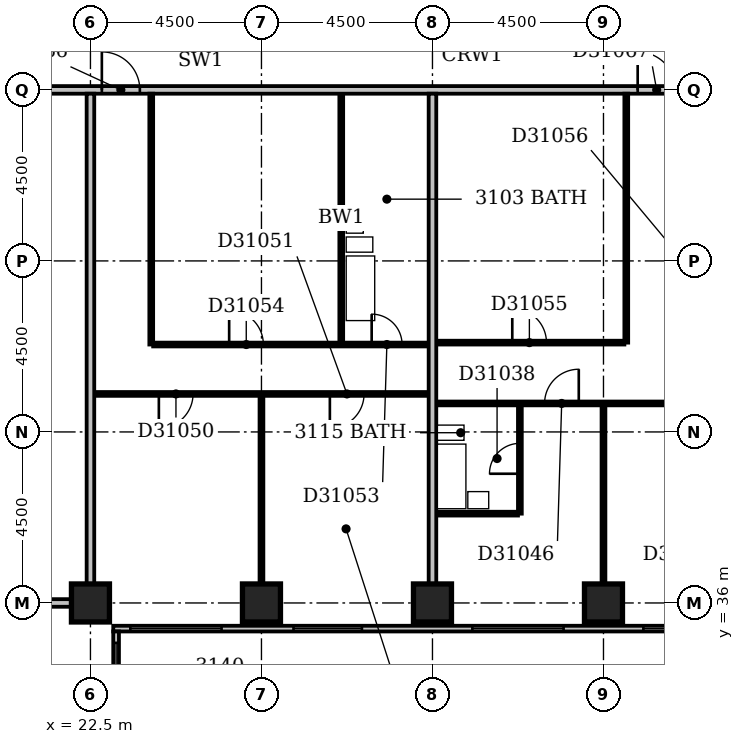
"""IFC4 building model, lengths in metres.
Left out: names, types, materials, properties, quantities, classifications, styles, units other than length and angle.
Written with IfcOpenShell. Run it as: python <this file> out.ifc"""

import sys

from ifc_helpers import new_model, si_unit, direction, frame, frame_2d, origin, origin_2d, place, context, subcontext, project, spatial, rectangle, extrude, element, fill, save


model = new_model("IFC4")
c1 = context("Model", 3, precision=1e-05, world=origin(), true_north=direction((0.0, 1.0)))
c2 = subcontext(c1, "Body", "Model", "MODEL_VIEW")
j1 = project(units=[si_unit("LENGTHUNIT", "METRE"), si_unit("PLANEANGLEUNIT", "RADIAN")], contexts=[c1])
p1 = place(None, origin())
s1 = spatial("IfcSite", under=j1, at=p1, CompositionType="ELEMENT")
p2 = place(p1, origin())
s2 = spatial("IfcBuilding", under=s1, at=p2, CompositionType="ELEMENT")
p3 = place(p2, frame((0.0, 0.0, 126.8)))
s3 = spatial("IfcBuildingStorey", under=s2, at=p3, CompositionType="ELEMENT", Elevation=126.8)
for number, where, z_axis, x_axis in (
    (1, (22.5, 36.0, -0.3), (0.0, 0.0, 1.0), (1.0, 0.0, 0.0)),
    (2, (27.0, 36.0, -0.3), (0.0, 0.0, 1.0), (1.0, 0.0, 0.0)),
    (3, (31.5, 36.0, -0.3), (0.0, 0.0, 1.0), (1.0, 0.0, 0.0)),
    (4, (36.0, 36.0, -0.3), (0.0, 0.0, 1.0), (1.0, 0.0, 0.0)),
):
    element("IfcColumn", number, at=place(p3, frame(where, z_axis=z_axis, x_axis=x_axis)), inside=s3, PredefinedType="COLUMN", context=c2, shape_type="SweptSolid", body=[
        extrude(rectangle(XDim=1.0, YDim=1.0, at=origin_2d()), origin(), (0.0, 0.0, 1.0), 3.6),
    ])
p4 = place(p3, frame((23.175, 17.4, 0.0), z_axis=(0.0, 0.0, 1.0), x_axis=(0.0, 1.0, 0.0)))
e5 = element("IfcWall", 5, at=p4, inside=s3, PredefinedType="STANDARD", context=c2, shape_type="SweptSolid", body=[
    extrude(rectangle(XDim=17.85, YDim=0.15, at=frame_2d((8.925, 0.0))), origin(), (0.0, 0.0, 1.0), 2.7),
])
p5 = place(p4, frame((1.65, 0.0, 0.6)))
e6 = element("IfcOpeningElement", 6, at=p5, cuts=e5, PredefinedType="OPENING", context=c2, shape_type="SweptSolid", body=[
    extrude(rectangle(XDim=2.4, YDim=1.8, at=frame_2d((1.2, 0.9))), frame((0.0, 0.087, 0.0), z_axis=(0.0, -1.0, 0.0), x_axis=(1.0, 0.0, 0.0)), (0.0, 0.0, 1.0), 0.174),
])
p6 = place(p4, frame((6.15, 0.0, 0.6)))
e7 = element("IfcOpeningElement", 7, at=p6, cuts=e5, PredefinedType="OPENING", context=c2, shape_type="SweptSolid", body=[
    extrude(rectangle(XDim=2.4, YDim=1.8, at=frame_2d((1.2, 0.9))), frame((0.0, 0.087, 0.0), z_axis=(0.0, -1.0, 0.0), x_axis=(1.0, 0.0, 0.0)), (0.0, 0.0, 1.0), 0.174),
])
p7 = place(p4, frame((11.498, 0.0, 0.6)))
e8 = element("IfcOpeningElement", 8, at=p7, cuts=e5, PredefinedType="OPENING", context=c2, shape_type="SweptSolid", body=[
    extrude(rectangle(XDim=1.8, YDim=1.8, at=frame_2d((0.9, 0.9))), frame((0.0, 0.087, 0.0), z_axis=(0.0, -1.0, 0.0), x_axis=(1.0, 0.0, 0.0)), (0.0, 0.0, 1.0), 0.174),
])
p8 = place(p4, frame((15.15, 0.0, 0.6)))
e9 = element("IfcOpeningElement", 9, at=p8, cuts=e5, PredefinedType="OPENING", context=c2, shape_type="SweptSolid", body=[
    extrude(rectangle(XDim=2.4, YDim=1.8, at=frame_2d((1.2, 0.9))), frame((0.0, 0.087, 0.0), z_axis=(0.0, -1.0, 0.0), x_axis=(1.0, 0.0, 0.0)), (0.0, 0.0, 1.0), 0.174),
])
p9 = place(p3, frame((23.1, 35.325, 0.0), z_axis=(0.0, 0.0, 1.0), x_axis=(1.0, 0.0, 0.0)))
e10 = element("IfcWall", 10, at=p9, inside=s3, PredefinedType="STANDARD", context=c2, shape_type="SweptSolid", body=[
    extrude(rectangle(XDim=45.15, YDim=0.15, at=frame_2d((22.575, 0.0))), origin(), (0.0, 0.0, 1.0), 2.7),
])
p10 = place(p9, frame((0.45, 0.0, 0.6)))
e11 = element("IfcOpeningElement", 11, at=p10, cuts=e10, PredefinedType="OPENING", context=c2, shape_type="SweptSolid", body=[
    extrude(rectangle(XDim=2.4, YDim=1.8, at=frame_2d((1.2, 0.9))), frame((0.0, 0.087, 0.0), z_axis=(0.0, -1.0, 0.0), x_axis=(1.0, 0.0, 0.0)), (0.0, 0.0, 1.0), 0.174),
])
p11 = place(p9, frame((4.743, 0.0, 0.6)))
e12 = element("IfcOpeningElement", 12, at=p11, cuts=e10, PredefinedType="OPENING", context=c2, shape_type="SweptSolid", body=[
    extrude(rectangle(XDim=1.8, YDim=1.8, at=frame_2d((0.9, 0.9))), frame((0.0, 0.087, 0.0), z_axis=(0.0, -1.0, 0.0), x_axis=(1.0, 0.0, 0.0)), (0.0, 0.0, 1.0), 0.174),
])
p12 = place(p9, frame((9.45, 0.0, 0.6)))
e13 = element("IfcOpeningElement", 13, at=p12, cuts=e10, PredefinedType="OPENING", context=c2, shape_type="SweptSolid", body=[
    extrude(rectangle(XDim=2.4, YDim=1.8, at=frame_2d((1.2, 0.9))), frame((0.0, 0.087, 0.0), z_axis=(0.0, -1.0, 0.0), x_axis=(1.0, 0.0, 0.0)), (0.0, 0.0, 1.0), 0.174),
])
p13 = place(p9, frame((13.95, 0.0, 0.6)))
e14 = element("IfcOpeningElement", 14, at=p13, cuts=e10, PredefinedType="OPENING", context=c2, shape_type="SweptSolid", body=[
    extrude(rectangle(XDim=2.4, YDim=1.8, at=frame_2d((1.2, 0.9))), frame((0.0, 0.087, 0.0), z_axis=(0.0, -1.0, 0.0), x_axis=(1.0, 0.0, 0.0)), (0.0, 0.0, 1.0), 0.174),
])
p14 = place(p9, frame((19.646, 0.0, 0.6)))
e15 = element("IfcOpeningElement", 15, at=p14, cuts=e10, PredefinedType="OPENING", context=c2, shape_type="SweptSolid", body=[
    extrude(rectangle(XDim=1.5, YDim=1.8, at=frame_2d((0.75, 0.9))), frame((0.0, 0.087, 0.0), z_axis=(0.0, -1.0, 0.0), x_axis=(1.0, 0.0, 0.0)), (0.0, 0.0, 1.0), 0.174),
])
p15 = place(p9, frame((22.95, 0.0, 0.6)))
e16 = element("IfcOpeningElement", 16, at=p15, cuts=e10, PredefinedType="OPENING", context=c2, shape_type="SweptSolid", body=[
    extrude(rectangle(XDim=2.4, YDim=1.8, at=frame_2d((1.2, 0.9))), frame((0.0, 0.087, 0.0), z_axis=(0.0, -1.0, 0.0), x_axis=(1.0, 0.0, 0.0)), (0.0, 0.0, 1.0), 0.174),
])
p16 = place(p9, frame((27.45, 0.0, 0.6)))
e17 = element("IfcOpeningElement", 17, at=p16, cuts=e10, PredefinedType="OPENING", context=c2, shape_type="SweptSolid", body=[
    extrude(rectangle(XDim=2.4, YDim=1.8, at=frame_2d((1.2, 0.9))), frame((0.0, 0.087, 0.0), z_axis=(0.0, -1.0, 0.0), x_axis=(1.0, 0.0, 0.0)), (0.0, 0.0, 1.0), 0.174),
])
p17 = place(p9, frame((31.95, 0.0, 0.6)))
e18 = element("IfcOpeningElement", 18, at=p17, cuts=e10, PredefinedType="OPENING", context=c2, shape_type="SweptSolid", body=[
    extrude(rectangle(XDim=2.4, YDim=1.8, at=frame_2d((1.2, 0.9))), frame((0.0, 0.087, 0.0), z_axis=(0.0, -1.0, 0.0), x_axis=(1.0, 0.0, 0.0)), (0.0, 0.0, 1.0), 0.174),
])
p18 = place(p9, frame((37.911, 0.0, 0.6)))
e19 = element("IfcOpeningElement", 19, at=p18, cuts=e10, PredefinedType="OPENING", context=c2, shape_type="SweptSolid", body=[
    extrude(rectangle(XDim=1.2, YDim=1.8, at=frame_2d((0.6, 0.9))), frame((0.0, 0.087, 0.0), z_axis=(0.0, -1.0, 0.0), x_axis=(1.0, 0.0, 0.0)), (0.0, 0.0, 1.0), 0.174),
])
p19 = place(p9, frame((40.95, 0.0, 0.6)))
e20 = element("IfcOpeningElement", 20, at=p19, cuts=e10, PredefinedType="OPENING", context=c2, shape_type="SweptSolid", body=[
    extrude(rectangle(XDim=2.4, YDim=1.8, at=frame_2d((1.2, 0.9))), frame((0.0, 0.087, 0.0), z_axis=(0.0, -1.0, 0.0), x_axis=(1.0, 0.0, 0.0)), (0.0, 0.0, 1.0), 0.174),
])
for number, where, z_axis, x_axis in (
    (21, (9.1, 36.0, 0.0), (0.0, 0.0, 1.0), (1.0, 0.0, 0.0)),
    (22, (22.5, 36.5, 0.0), (0.0, 0.0, 1.0), (0.0, 1.0, 0.0)),
):
    element("IfcWall", number, at=place(p3, frame(where, z_axis=z_axis, x_axis=x_axis)), inside=s3, PredefinedType="PARTITIONING", context=c2, shape_type="SweptSolid", body=[
        extrude(rectangle(XDim=12.9, YDim=0.2, at=frame_2d((6.45, 0.0))), origin(), (0.0, 0.0, 1.0), 3.3),
    ])
p20 = place(p3, frame((27.0, 36.5, 0.0), z_axis=(0.0, 0.0, 1.0), x_axis=(0.0, 1.0, 0.0)))
e23 = element("IfcWall", 23, at=p20, inside=s3, PredefinedType="PARTITIONING", context=c2, shape_type="SweptSolid", body=[
    extrude(rectangle(XDim=4.95, YDim=0.1, at=frame_2d((2.475, 0.0))), origin(), (0.0, 0.0, 1.0), 2.6),
])
p21 = place(p3, frame((31.5, 36.5, 0.0), z_axis=(0.0, 0.0, 1.0), x_axis=(0.0, 1.0, 0.0)))
e24 = element("IfcWall", 24, at=p21, inside=s3, PredefinedType="PARTITIONING", context=c2, shape_type="SweptSolid", body=[
    extrude(rectangle(XDim=12.9, YDim=0.2, at=frame_2d((6.45, 0.0))), origin(), (0.0, 0.0, 1.0), 3.3),
])
p22 = place(p3, frame((36.0, 36.5, 0.0), z_axis=(0.0, 0.0, 1.0), x_axis=(0.0, 1.0, 0.0)))
e25 = element("IfcWall", 25, at=p22, inside=s3, PredefinedType="PARTITIONING", context=c2, shape_type="SweptSolid", body=[
    extrude(rectangle(XDim=4.7, YDim=0.1, at=frame_2d((2.35, 0.0))), origin(), (0.0, 0.0, 1.0), 2.4),
])
p23 = place(p3, frame((31.6, 38.35, 0.0), z_axis=(0.0, 0.0, 1.0), x_axis=(1.0, 0.0, 0.0)))
e26 = element("IfcWall", 26, at=p23, inside=s3, PredefinedType="PLUMBINGWALL", context=c2, shape_type="SweptSolid", body=[
    extrude(rectangle(XDim=2.15, YDim=0.1, at=frame_2d((1.075, 0.0))), origin(), (0.0, 0.0, 1.0), 3.3),
])
p24 = place(p3, frame((33.8, 38.35, 0.0), z_axis=(0.0, 0.0, 1.0), x_axis=(0.0, 1.0, 0.0)))
e27 = element("IfcWall", 27, at=p24, inside=s3, PredefinedType="PLUMBINGWALL", context=c2, shape_type="SweptSolid", body=[
    extrude(rectangle(XDim=2.85, YDim=0.1, at=frame_2d((1.425, 0.0))), origin(), (0.0, 0.0, 1.0), 3.3),
])
p25 = place(p24, frame((1.05, 0.0, 0.0)))
e28 = element("IfcOpeningElement", 28, at=p25, cuts=e27, PredefinedType="OPENING", context=c2, shape_type="SweptSolid", body=[
    extrude(rectangle(XDim=0.8, YDim=2.1, at=frame_2d((0.4, 1.05))), frame((0.0, 0.062, 0.0), z_axis=(0.0, -1.0, 0.0), x_axis=(1.0, 0.0, 0.0)), (0.0, 0.0, 1.0), 0.124),
])
p26 = place(p3, frame((31.6, 41.25, 0.0), z_axis=(0.0, 0.0, 1.0), x_axis=(1.0, 0.0, 0.0)))
e29 = element("IfcWall", 29, at=p26, inside=s3, PredefinedType="PARTITIONING", context=c2, shape_type="SweptSolid", body=[
    extrude(rectangle(XDim=17.8, YDim=0.1, at=frame_2d((8.9, 0.0))), origin(), (0.0, 0.0, 1.0), 3.3),
])
p27 = place(p26, frame((2.85, 0.0, 0.0)))
e30 = element("IfcOpeningElement", 30, at=p27, cuts=e29, PredefinedType="OPENING", context=c2, shape_type="SweptSolid", body=[
    extrude(rectangle(XDim=0.9, YDim=2.1, at=frame_2d((0.45, 1.05))), frame((0.0, 0.062, 0.0), z_axis=(0.0, -1.0, 0.0), x_axis=(1.0, 0.0, 0.0)), (0.0, 0.0, 1.0), 0.124),
])
p28 = place(p26, frame((8.4, 0.0, 0.0)))
e31 = element("IfcOpeningElement", 31, at=p28, cuts=e29, PredefinedType="OPENING", context=c2, shape_type="SweptSolid", body=[
    extrude(rectangle(XDim=0.9, YDim=2.1, at=frame_2d((0.45, 1.05))), frame((0.0, 0.062, 0.0), z_axis=(0.0, -1.0, 0.0), x_axis=(1.0, 0.0, 0.0)), (0.0, 0.0, 1.0), 0.124),
])
p29 = place(p26, frame((14.05, 0.0, 0.0)))
e32 = element("IfcOpeningElement", 32, at=p29, cuts=e29, PredefinedType="OPENING", context=c2, shape_type="SweptSolid", body=[
    extrude(rectangle(XDim=0.9, YDim=2.1, at=frame_2d((0.45, 1.05))), frame((0.0, 0.062, 0.0), z_axis=(0.0, -1.0, 0.0), x_axis=(1.0, 0.0, 0.0)), (0.0, 0.0, 1.0), 0.124),
])
p30 = place(p3, frame((22.6, 41.5, 0.0), z_axis=(0.0, 0.0, 1.0), x_axis=(1.0, 0.0, 0.0)))
e33 = element("IfcWall", 33, at=p30, inside=s3, PredefinedType="PARTITIONING", context=c2, shape_type="SweptSolid", body=[
    extrude(rectangle(XDim=8.8, YDim=0.1, at=frame_2d((4.4, 0.0))), origin(), (0.0, 0.0, 1.0), 3.3),
])
p31 = place(p30, frame((1.7, 0.0, 0.0)))
e34 = element("IfcOpeningElement", 34, at=p31, cuts=e33, PredefinedType="OPENING", context=c2, shape_type="SweptSolid", body=[
    extrude(rectangle(XDim=0.9, YDim=2.1, at=frame_2d((0.45, 1.05))), frame((0.0, 0.062, 0.0), z_axis=(0.0, -1.0, 0.0), x_axis=(1.0, 0.0, 0.0)), (0.0, 0.0, 1.0), 0.124),
])
p32 = place(p30, frame((6.2, 0.0, 0.0)))
e35 = element("IfcOpeningElement", 35, at=p32, cuts=e33, PredefinedType="OPENING", context=c2, shape_type="SweptSolid", body=[
    extrude(rectangle(XDim=0.9, YDim=2.1, at=frame_2d((0.45, 1.05))), frame((0.0, 0.062, 0.0), z_axis=(0.0, -1.0, 0.0), x_axis=(1.0, 0.0, 0.0)), (0.0, 0.0, 1.0), 0.124),
])
p33 = place(p3, frame((24.1, 42.8, 0.0), z_axis=(0.0, 0.0, 1.0), x_axis=(0.0, 1.0, 0.0)))
e36 = element("IfcWall", 36, at=p33, inside=s3, PredefinedType="PARTITIONING", context=c2, shape_type="SweptSolid", body=[
    extrude(rectangle(XDim=6.6, YDim=0.1, at=frame_2d((3.3, 0.0))), origin(), (0.0, 0.0, 1.0), 3.3),
])
p34 = place(p3, frame((24.15, 42.8, 0.0), z_axis=(0.0, 0.0, 1.0), x_axis=(1.0, 0.0, 0.0)))
e37 = element("IfcWall", 37, at=p34, inside=s3, PredefinedType="PARTITIONING", context=c2, shape_type="SweptSolid", body=[
    extrude(rectangle(XDim=7.25, YDim=0.1, at=frame_2d((3.625, 0.0))), origin(), (0.0, 0.0, 1.0), 3.3),
])
p35 = place(p34, frame((5.75, 0.0, 0.0)))
e38 = element("IfcOpeningElement", 38, at=p35, cuts=e37, PredefinedType="OPENING", context=c2, shape_type="SweptSolid", body=[
    extrude(rectangle(XDim=0.8, YDim=2.1, at=frame_2d((0.4, 1.05))), frame((0.0, 0.062, 0.0), z_axis=(0.0, -1.0, 0.0), x_axis=(1.0, 0.0, 0.0)), (0.0, 0.0, 1.0), 0.124),
])
p36 = place(p34, frame((2.0, 0.0, 0.0)))
e39 = element("IfcOpeningElement", 39, at=p36, cuts=e37, PredefinedType="OPENING", context=c2, shape_type="SweptSolid", body=[
    extrude(rectangle(XDim=0.9, YDim=2.1, at=frame_2d((0.45, 1.05))), frame((0.0, 0.062, 0.0), z_axis=(0.0, -1.0, 0.0), x_axis=(1.0, 0.0, 0.0)), (0.0, 0.0, 1.0), 0.124),
])
p37 = place(p3, frame((29.1, 42.85, 0.0), z_axis=(0.0, 0.0, 1.0), x_axis=(0.0, 1.0, 0.0)))
e40 = element("IfcWall", 40, at=p37, inside=s3, PredefinedType="PLUMBINGWALL", context=c2, shape_type="SweptSolid", body=[
    extrude(rectangle(XDim=6.55, YDim=0.1, at=frame_2d((3.275, 0.0))), origin(), (0.0, 0.0, 1.0), 3.3),
])
p38 = place(p3, frame((31.6, 42.85, 0.0), z_axis=(0.0, 0.0, 1.0), x_axis=(1.0, 0.0, 0.0)))
e41 = element("IfcWall", 41, at=p38, inside=s3, PredefinedType="PARTITIONING", context=c2, shape_type="SweptSolid", body=[
    extrude(rectangle(XDim=4.95, YDim=0.1, at=frame_2d((2.475, 0.0))), origin(), (0.0, 0.0, 1.0), 3.3),
])
p39 = place(p38, frame((2.0, 0.0, 0.0)))
e42 = element("IfcOpeningElement", 42, at=p39, cuts=e41, PredefinedType="OPENING", context=c2, shape_type="SweptSolid", body=[
    extrude(rectangle(XDim=0.9, YDim=2.1, at=frame_2d((0.45, 1.05))), frame((0.0, 0.062, 0.0), z_axis=(0.0, -1.0, 0.0), x_axis=(1.0, 0.0, 0.0)), (0.0, 0.0, 1.0), 0.124),
])
p40 = place(p3, frame((36.6, 42.85, 0.0), z_axis=(0.0, 0.0, 1.0), x_axis=(0.0, 1.0, 0.0)))
e43 = element("IfcWall", 43, at=p40, inside=s3, PredefinedType="PARTITIONING", context=c2, shape_type="SweptSolid", body=[
    extrude(rectangle(XDim=6.55, YDim=0.1, at=frame_2d((3.275, 0.0))), origin(), (0.0, 0.0, 1.0), 2.4),
])
p41 = place(p3, frame((9.1, 49.5, 0.0), z_axis=(0.0, 0.0, 1.0), x_axis=(1.0, 0.0, 0.0)))
e44 = element("IfcWall", 44, at=p41, inside=s3, PredefinedType="PARTITIONING", context=c2, shape_type="SweptSolid", body=[
    extrude(rectangle(XDim=41.55, YDim=0.2, at=frame_2d((20.775, 0.0))), origin(), (0.0, 0.0, 1.0), 3.3),
])
p42 = place(p41, frame((13.7, 0.0, 0.0)))
e45 = element("IfcOpeningElement", 45, at=p42, cuts=e44, PredefinedType="OPENING", context=c2, shape_type="SweptSolid", body=[
    extrude(rectangle(XDim=1.0, YDim=2.1, at=frame_2d((0.5, 1.05))), frame((0.0, 0.112, 0.0), z_axis=(0.0, -1.0, 0.0), x_axis=(1.0, 0.0, 0.0)), (0.0, 0.0, 1.0), 0.224),
])
p43 = place(p41, frame((27.8, 0.0, 0.0)))
e46 = element("IfcOpeningElement", 46, at=p43, cuts=e44, PredefinedType="OPENING", context=c2, shape_type="SweptSolid", body=[
    extrude(rectangle(XDim=1.0, YDim=2.1, at=frame_2d((0.5, 1.05))), frame((0.0, 0.112, 0.0), z_axis=(0.0, -1.0, 0.0), x_axis=(1.0, 0.0, 0.0)), (0.0, 0.0, 1.0), 0.224),
])
p44 = place(p41, frame((8.4, 0.0, 0.0)))
e47 = element("IfcOpeningElement", 47, at=p44, cuts=e44, PredefinedType="OPENING", context=c2, shape_type="SweptSolid", body=[
    extrude(rectangle(XDim=0.9, YDim=2.1, at=frame_2d((0.45, 1.05))), frame((0.0, 0.112, 0.0), z_axis=(0.0, -1.0, 0.0), x_axis=(1.0, 0.0, 0.0)), (0.0, 0.0, 1.0), 0.224),
])
p45 = place(p8, origin())
e48 = element("IfcWindow", 48, at=p45, inside=s3, PartitioningType="SINGLE_PANEL", PredefinedType="WINDOW", context=c2, shape_type="SweptSolid", body=[
    extrude(rectangle(XDim=2.4, YDim=1.8, at=frame_2d((1.2, 0.9))), frame((0.0, 0.03, 0.0), z_axis=(0.0, -1.0, 0.0), x_axis=(1.0, 0.0, 0.0)), (0.0, 0.0, 1.0), 0.06),
])
fill(e9, e48)
p46 = place(p10, origin())
e49 = element("IfcWindow", 49, at=p46, inside=s3, PartitioningType="SINGLE_PANEL", PredefinedType="WINDOW", context=c2, shape_type="SweptSolid", body=[
    extrude(rectangle(XDim=2.4, YDim=1.8, at=frame_2d((1.2, 0.9))), frame((0.0, 0.03, 0.0), z_axis=(0.0, -1.0, 0.0), x_axis=(1.0, 0.0, 0.0)), (0.0, 0.0, 1.0), 0.06),
])
fill(e11, e49)
p47 = place(p11, origin())
e50 = element("IfcWindow", 50, at=p47, inside=s3, PartitioningType="SINGLE_PANEL", PredefinedType="WINDOW", context=c2, shape_type="SweptSolid", body=[
    extrude(rectangle(XDim=1.8, YDim=1.8, at=frame_2d((0.9, 0.9))), frame((0.0, 0.03, 0.0), z_axis=(0.0, -1.0, 0.0), x_axis=(1.0, 0.0, 0.0)), (0.0, 0.0, 1.0), 0.06),
])
fill(e12, e50)
p48 = place(p12, origin())
e51 = element("IfcWindow", 51, at=p48, inside=s3, PartitioningType="SINGLE_PANEL", PredefinedType="WINDOW", context=c2, shape_type="SweptSolid", body=[
    extrude(rectangle(XDim=2.4, YDim=1.8, at=frame_2d((1.2, 0.9))), frame((0.0, 0.03, 0.0), z_axis=(0.0, -1.0, 0.0), x_axis=(1.0, 0.0, 0.0)), (0.0, 0.0, 1.0), 0.06),
])
fill(e13, e51)
p49 = place(p13, origin())
e52 = element("IfcWindow", 52, at=p49, inside=s3, PartitioningType="SINGLE_PANEL", PredefinedType="WINDOW", context=c2, shape_type="SweptSolid", body=[
    extrude(rectangle(XDim=2.4, YDim=1.8, at=frame_2d((1.2, 0.9))), frame((0.0, 0.03, 0.0), z_axis=(0.0, -1.0, 0.0), x_axis=(1.0, 0.0, 0.0)), (0.0, 0.0, 1.0), 0.06),
])
fill(e14, e52)
p50 = place(p25, origin())
e53 = element("IfcDoor", 53, at=p50, inside=s3, OperationType="SINGLE_SWING_LEFT", PredefinedType="DOOR", context=c2, shape_type="SweptSolid", body=[
    extrude(rectangle(XDim=0.8, YDim=2.1, at=frame_2d((0.4, 1.05))), frame((0.0, 0.025, 0.0), z_axis=(0.0, -1.0, 0.0), x_axis=(1.0, 0.0, 0.0)), (0.0, 0.0, 1.0), 0.05),
])
fill(e28, e53)
p51 = place(p27, frame((0.9, 0.0, 0.0), z_axis=(0.0, 0.0, 1.0), x_axis=(-1.0, 0.0, 0.0)))
e54 = element("IfcDoor", 54, at=p51, inside=s3, OperationType="SINGLE_SWING_LEFT", PredefinedType="DOOR", context=c2, shape_type="SweptSolid", body=[
    extrude(rectangle(XDim=0.9, YDim=2.1, at=frame_2d((0.45, 1.05))), frame((0.0, 0.025, 0.0), z_axis=(0.0, -1.0, 0.0), x_axis=(1.0, 0.0, 0.0)), (0.0, 0.0, 1.0), 0.05),
])
fill(e30, e54)
p52 = place(p31, frame((0.9, 0.0, 0.0), z_axis=(0.0, 0.0, 1.0), x_axis=(-1.0, 0.0, 0.0)))
e55 = element("IfcDoor", 55, at=p52, inside=s3, OperationType="SINGLE_SWING_RIGHT", PredefinedType="DOOR", context=c2, shape_type="SweptSolid", body=[
    extrude(rectangle(XDim=0.9, YDim=2.1, at=frame_2d((0.45, 1.05))), frame((0.0, 0.025, 0.0), z_axis=(0.0, -1.0, 0.0), x_axis=(1.0, 0.0, 0.0)), (0.0, 0.0, 1.0), 0.05),
])
fill(e34, e55)
p53 = place(p32, frame((0.9, 0.0, 0.0), z_axis=(0.0, 0.0, 1.0), x_axis=(-1.0, 0.0, 0.0)))
e56 = element("IfcDoor", 56, at=p53, inside=s3, OperationType="SINGLE_SWING_RIGHT", PredefinedType="DOOR", context=c2, shape_type="SweptSolid", body=[
    extrude(rectangle(XDim=0.9, YDim=2.1, at=frame_2d((0.45, 1.05))), frame((0.0, 0.025, 0.0), z_axis=(0.0, -1.0, 0.0), x_axis=(1.0, 0.0, 0.0)), (0.0, 0.0, 1.0), 0.05),
])
fill(e35, e56)
p54 = place(p35, origin())
e57 = element("IfcDoor", 57, at=p54, inside=s3, OperationType="SINGLE_SWING_LEFT", PredefinedType="DOOR", context=c2, shape_type="SweptSolid", body=[
    extrude(rectangle(XDim=0.8, YDim=2.1, at=frame_2d((0.4, 1.05))), frame((0.0, 0.025, 0.0), z_axis=(0.0, -1.0, 0.0), x_axis=(1.0, 0.0, 0.0)), (0.0, 0.0, 1.0), 0.05),
])
fill(e38, e57)
p55 = place(p36, origin())
e58 = element("IfcDoor", 58, at=p55, inside=s3, OperationType="SINGLE_SWING_LEFT", PredefinedType="DOOR", context=c2, shape_type="SweptSolid", body=[
    extrude(rectangle(XDim=0.9, YDim=2.1, at=frame_2d((0.45, 1.05))), frame((0.0, 0.025, 0.0), z_axis=(0.0, -1.0, 0.0), x_axis=(1.0, 0.0, 0.0)), (0.0, 0.0, 1.0), 0.05),
])
fill(e39, e58)
p56 = place(p39, origin())
e59 = element("IfcDoor", 59, at=p56, inside=s3, OperationType="SINGLE_SWING_LEFT", PredefinedType="DOOR", context=c2, shape_type="SweptSolid", body=[
    extrude(rectangle(XDim=0.9, YDim=2.1, at=frame_2d((0.45, 1.05))), frame((0.0, 0.025, 0.0), z_axis=(0.0, -1.0, 0.0), x_axis=(1.0, 0.0, 0.0)), (0.0, 0.0, 1.0), 0.05),
])
fill(e42, e59)
p57 = place(p42, origin())
e60 = element("IfcDoor", 60, at=p57, inside=s3, OperationType="SINGLE_SWING_LEFT", PredefinedType="DOOR", context=c2, shape_type="SweptSolid", body=[
    extrude(rectangle(XDim=1.0, YDim=2.1, at=frame_2d((0.5, 1.05))), frame((0.0, 0.025, 0.0), z_axis=(0.0, -1.0, 0.0), x_axis=(1.0, 0.0, 0.0)), (0.0, 0.0, 1.0), 0.05),
])
fill(e45, e60)
p58 = place(p43, origin())
e61 = element("IfcDoor", 61, at=p58, inside=s3, OperationType="SINGLE_SWING_LEFT", PredefinedType="DOOR", context=c2, shape_type="SweptSolid", body=[
    extrude(rectangle(XDim=1.0, YDim=2.1, at=frame_2d((0.5, 1.05))), frame((0.0, 0.025, 0.0), z_axis=(0.0, -1.0, 0.0), x_axis=(1.0, 0.0, 0.0)), (0.0, 0.0, 1.0), 0.05),
])
fill(e46, e61)
save(model, sys.argv[1])
